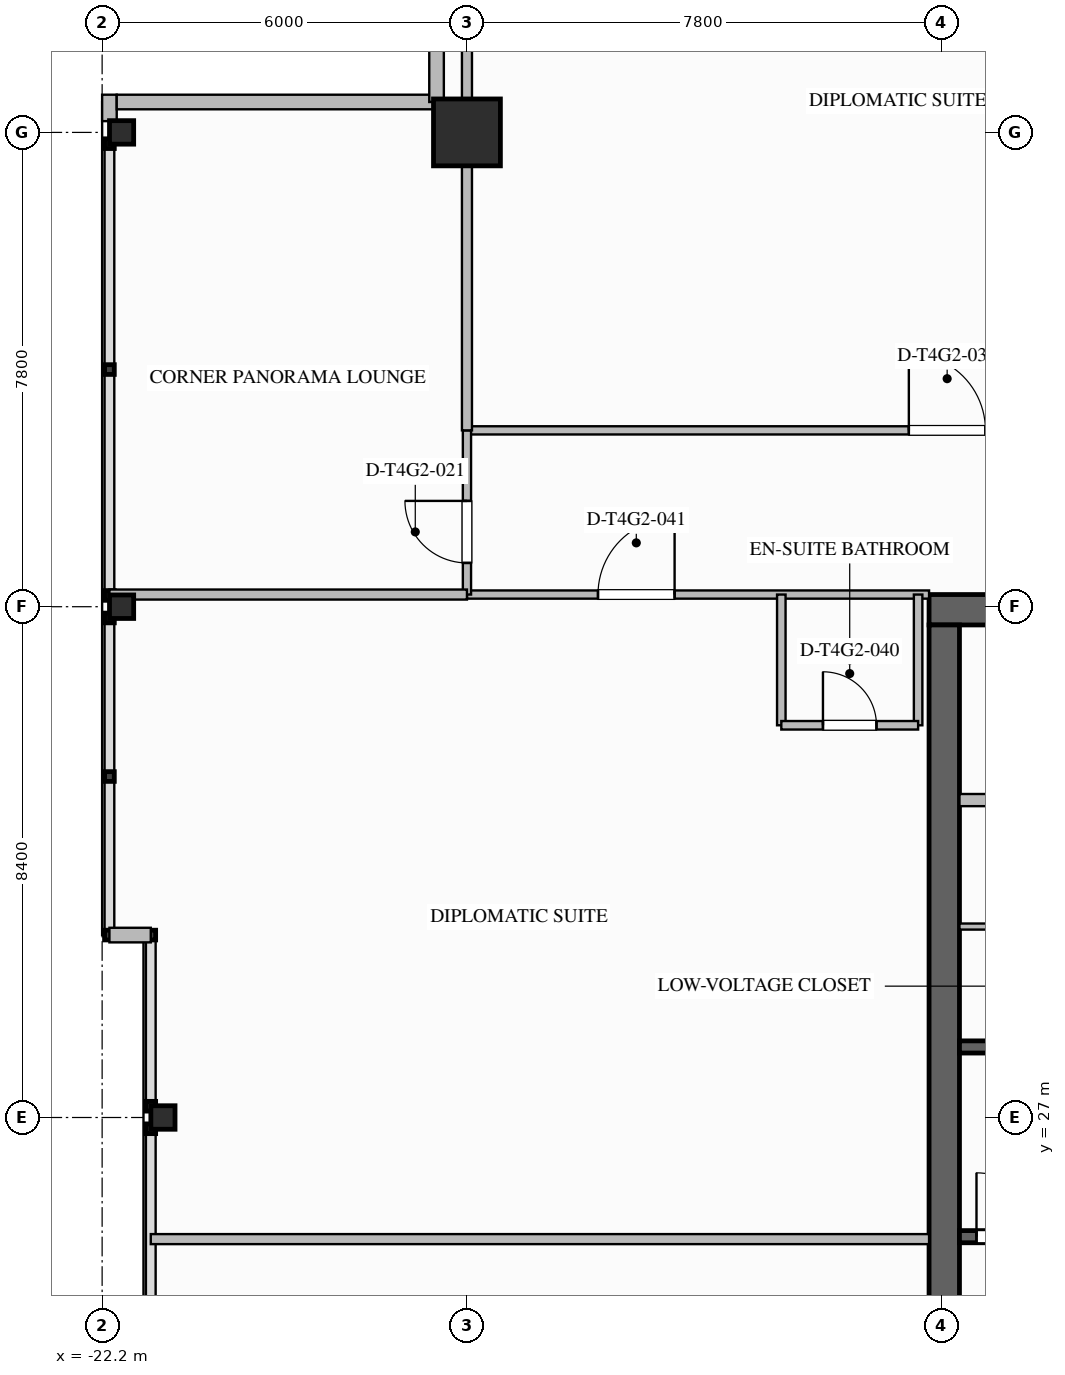
"""IFC4 building model, lengths in metres.
Left out: names, types, materials, properties, quantities, classifications, styles, units other than length and angle.
Written with IfcOpenShell. Run it as: python <this file> out.ifc"""

import sys

from ifc_helpers import new_model, si_unit, direction, frame, frame_2d, origin, origin_2d, place, context, subcontext, project, spatial, rectangle, i_section, extrude, element, fill, save


model = new_model("IFC4")
c1 = context("Model", 3, precision=1e-05, world=origin(), true_north=direction((0.0, 1.0)))
c2 = subcontext(c1, "Body", "Model", "MODEL_VIEW")
j1 = project(units=[si_unit("LENGTHUNIT", "METRE"), si_unit("PLANEANGLEUNIT", "RADIAN")], contexts=[c1])
p1 = place(None, origin())
s1 = spatial("IfcSite", under=j1, at=p1, CompositionType="ELEMENT")
p2 = place(p1, origin())
s2 = spatial("IfcBuilding", under=s1, at=p2, CompositionType="ELEMENT")
p3 = place(p2, frame((0.0, 0.0, 215.9)))
s3 = spatial("IfcBuildingStorey", under=s2, at=p3, CompositionType="ELEMENT", Elevation=215.9)
p4 = place(p3, frame((-8.6, 35.35, 0.0), z_axis=(0.0, 0.0, 1.0), x_axis=(1.0, 0.0, 0.0)))
e1 = element("IfcWall", 1, at=p4, inside=s3, PredefinedType="SHEAR", context=c2, shape_type="SweptSolid", body=[
    extrude(rectangle(XDim=17.2, YDim=0.5, at=frame_2d((8.6, 0.0))), origin(), (0.0, 0.0, 1.0), 3.6),
])
p5 = place(p3, frame((-8.35, 18.9, 0.0), z_axis=(0.0, 0.0, 1.0), x_axis=(0.0, 1.0, 0.0)))
e2 = element("IfcWall", 2, at=p5, inside=s3, PredefinedType="SHEAR", context=c2, shape_type="SweptSolid", body=[
    extrude(rectangle(XDim=16.2, YDim=0.5, at=frame_2d((8.1, 0.0))), origin(), (0.0, 0.0, 1.0), 3.6),
])
p6 = place(p3, frame((-16.2, 43.2, 0.0), z_axis=(0.0, 0.0, 1.0), x_axis=(1.0, 0.0, 0.0)))
e3 = element("IfcColumn", 3, at=p6, inside=s3, PredefinedType="COLUMN", context=c2, shape_type="SweptSolid", body=[
    extrude(rectangle(XDim=1.1, YDim=1.1, at=origin_2d()), origin(), (0.0, 0.0, 1.0), 3.6),
])
for number, where, z_axis, x_axis in (
    (4, (-21.2, 27.0, 0.0), (0.0, 0.0, 1.0), (1.0, 0.0, 0.0)),
    (5, (-21.88, 35.4, 0.0), (0.0, 0.0, 1.0), (1.0, 0.0, 0.0)),
    (6, (-21.88, 43.2, 0.0), (0.0, 0.0, 1.0), (1.0, 0.0, 0.0)),
):
    element("IfcColumn", number, at=place(p3, frame(where, z_axis=z_axis, x_axis=x_axis)), inside=s3, PredefinedType="COLUMN", context=c2, shape_type="SweptSolid", body=[
        extrude(i_section(OverallWidth=0.397, OverallDepth=0.387, WebThickness=0.021, FlangeThickness=0.033, FilletRadius=0.025, at=origin_2d()), origin(), (0.0, 0.0, 1.0), 3.597),
    ])
p7 = place(p3, frame((-22.08, 43.385, 0.0), z_axis=(0.0, 0.0, 1.0), x_axis=(0.0, 1.0, 0.0)))
e7 = element("IfcWall", 7, at=p7, inside=s3, PredefinedType="STANDARD", context=c2, shape_type="SweptSolid", body=[
    extrude(rectangle(XDim=0.435, YDim=0.24, at=frame_2d((0.217, 0.0))), origin(), (0.0, 0.0, 1.0), 3.34),
])
for number, where, z_axis, x_axis in (
    (8, (-21.96, 43.7, 0.0), (0.0, 0.0, 1.0), (1.0, 0.0, 0.0)),
    (9, (-16.7, 43.7, 0.0), (0.0, 0.0, 1.0), (0.0, 1.0, 0.0)),
):
    element("IfcWall", number, at=place(p3, frame(where, z_axis=z_axis, x_axis=x_axis)), inside=s3, PredefinedType="STANDARD", context=c2, shape_type="SweptSolid", body=[
        extrude(rectangle(XDim=5.26, YDim=0.24, at=frame_2d((2.63, 0.0))), origin(), (0.0, 0.0, 1.0), 3.34),
    ])
p8 = place(p3, frame((-21.4, 30.0, 0.0), z_axis=(0.0, 0.0, 1.0), x_axis=(-1.0, 0.0, 0.0)))
e10 = element("IfcWall", 10, at=p8, inside=s3, PredefinedType="STANDARD", context=c2, shape_type="SweptSolid", body=[
    extrude(rectangle(XDim=0.68, YDim=0.24, at=frame_2d((0.34, 0.0))), origin(), (0.0, 0.0, 1.0), 3.34),
])
p9 = place(p3, frame((-8.1, 25.04, 0.0), z_axis=(0.0, 0.0, 1.0), x_axis=(1.0, 0.0, 0.0)))
e11 = element("IfcWall", 11, at=p9, inside=s3, PredefinedType="SOLIDWALL", context=c2, shape_type="SweptSolid", body=[
    extrude(rectangle(XDim=8.1, YDim=0.2, at=frame_2d((4.05, 0.0))), origin(), (0.0, 0.0, 1.0), 3.34),
])
p10 = place(p9, frame((0.28, 0.0, 0.0)))
e12 = element("IfcOpeningElement", 12, at=p10, cuts=e11, PredefinedType="OPENING", context=c2, shape_type="SweptSolid", body=[
    extrude(rectangle(XDim=1.05, YDim=2.1, at=frame_2d((0.525, 1.05))), frame((0.0, 0.11, 0.0), z_axis=(0.0, -1.0, 0.0), x_axis=(1.0, 0.0, 0.0)), (0.0, 0.0, 1.0), 0.22),
])
p11 = place(p3, frame((-8.1, 28.16, 0.0), z_axis=(0.0, 0.0, 1.0), x_axis=(1.0, 0.0, 0.0)))
e13 = element("IfcWall", 13, at=p11, inside=s3, PredefinedType="SOLIDWALL", context=c2, shape_type="SweptSolid", body=[
    extrude(rectangle(XDim=8.1, YDim=0.2, at=frame_2d((4.05, 0.0))), origin(), (0.0, 0.0, 1.0), 3.34),
])
p12 = place(p3, frame((-8.1, 32.22, 0.0), z_axis=(0.0, 0.0, 1.0), x_axis=(1.0, 0.0, 0.0)))
e14 = element("IfcWall", 14, at=p12, inside=s3, PredefinedType="SOLIDWALL", context=c2, shape_type="SweptSolid", body=[
    extrude(rectangle(XDim=7.1, YDim=0.2, at=frame_2d((3.55, 0.0))), origin(), (0.0, 0.0, 1.0), 3.34),
])
p13 = place(p12, frame((0.95, 0.0, 0.0)))
e15 = element("IfcOpeningElement", 15, at=p13, cuts=e14, PredefinedType="OPENING", context=c2, shape_type="SweptSolid", body=[
    extrude(rectangle(XDim=1.1, YDim=2.2, at=frame_2d((0.55, 1.1))), frame((0.0, 0.11, 0.0), z_axis=(0.0, -1.0, 0.0), x_axis=(1.0, 0.0, 0.0)), (0.0, 0.0, 1.0), 0.22),
])
p14 = place(p12, frame((3.27, 0.0, 0.0)))
e16 = element("IfcOpeningElement", 16, at=p14, cuts=e14, PredefinedType="OPENING", context=c2, shape_type="SweptSolid", body=[
    extrude(rectangle(XDim=1.1, YDim=2.2, at=frame_2d((0.55, 1.1))), frame((0.0, 0.11, 0.0), z_axis=(0.0, -1.0, 0.0), x_axis=(1.0, 0.0, 0.0)), (0.0, 0.0, 1.0), 0.22),
])
p15 = place(p12, frame((5.59, 0.0, 0.0)))
e17 = element("IfcOpeningElement", 17, at=p15, cuts=e14, PredefinedType="OPENING", context=c2, shape_type="SweptSolid", body=[
    extrude(rectangle(XDim=1.1, YDim=2.2, at=frame_2d((0.55, 1.1))), frame((0.0, 0.11, 0.0), z_axis=(0.0, -1.0, 0.0), x_axis=(1.0, 0.0, 0.0)), (0.0, 0.0, 1.0), 0.22),
])
p16 = place(p3, frame((-8.1, 30.14, 0.0), z_axis=(0.0, 0.0, 1.0), x_axis=(1.0, 0.0, 0.0)))
e18 = element("IfcWall", 18, at=p16, inside=s3, PredefinedType="PARTITIONING", context=c2, shape_type="SweptSolid", body=[
    extrude(rectangle(XDim=7.1, YDim=0.1, at=frame_2d((3.55, 0.0))), origin(), (0.0, 0.0, 1.0), 3.34),
])
p17 = place(p16, frame((0.55, 0.0, 0.0)))
e19 = element("IfcOpeningElement", 19, at=p17, cuts=e18, PredefinedType="OPENING", context=c2, shape_type="SweptSolid", body=[
    extrude(rectangle(XDim=0.88, YDim=2.1, at=frame_2d((0.44, 1.05))), frame((0.0, 0.06, 0.0), z_axis=(0.0, -1.0, 0.0), x_axis=(1.0, 0.0, 0.0)), (0.0, 0.0, 1.0), 0.12),
])
p18 = place(p16, frame((3.6, 0.0, 0.0)))
e20 = element("IfcOpeningElement", 20, at=p18, cuts=e18, PredefinedType="OPENING", context=c2, shape_type="SweptSolid", body=[
    extrude(rectangle(XDim=0.92, YDim=2.1, at=frame_2d((0.46, 1.05))), frame((0.0, 0.06, 0.0), z_axis=(0.0, -1.0, 0.0), x_axis=(1.0, 0.0, 0.0)), (0.0, 0.0, 1.0), 0.12),
])
p19 = place(p3, frame((-16.2, 38.3, 0.0), z_axis=(0.0, 0.0, 1.0), x_axis=(1.0, 0.0, 0.0)))
e21 = element("IfcWall", 21, at=p19, inside=s3, PredefinedType="PARTITIONING", context=c2, shape_type="SweptSolid", body=[
    extrude(rectangle(XDim=38.28, YDim=0.135, at=frame_2d((19.14, 0.0))), origin(), (0.0, 0.0, 1.0), 3.34),
])
p20 = place(p19, frame((33.355, 0.0, 0.0)))
e22 = element("IfcOpeningElement", 22, at=p20, cuts=e21, PredefinedType="OPENING", context=c2, shape_type="SweptSolid", body=[
    extrude(rectangle(XDim=1.26, YDim=2.2, at=frame_2d((0.63, 1.1))), frame((0.0, 0.077, 0.0), z_axis=(0.0, -1.0, 0.0), x_axis=(1.0, 0.0, 0.0)), (0.0, 0.0, 1.0), 0.155),
])
p21 = place(p19, frame((7.268, 0.0, 0.0)))
e23 = element("IfcOpeningElement", 23, at=p21, cuts=e21, PredefinedType="OPENING", context=c2, shape_type="SweptSolid", body=[
    extrude(rectangle(XDim=1.26, YDim=2.2, at=frame_2d((0.63, 1.1))), frame((0.0, 0.077, 0.0), z_axis=(0.0, -1.0, 0.0), x_axis=(1.0, 0.0, 0.0)), (0.0, 0.0, 1.0), 0.155),
])
p22 = place(p19, frame((23.468, 0.0, 0.0)))
e24 = element("IfcOpeningElement", 24, at=p22, cuts=e21, PredefinedType="OPENING", context=c2, shape_type="SweptSolid", body=[
    extrude(rectangle(XDim=1.26, YDim=2.2, at=frame_2d((0.63, 1.1))), frame((0.0, 0.077, 0.0), z_axis=(0.0, -1.0, 0.0), x_axis=(1.0, 0.0, 0.0)), (0.0, 0.0, 1.0), 0.155),
])
p23 = place(p3, frame((-16.2, 35.6, 0.0), z_axis=(0.0, 0.0, 1.0), x_axis=(1.0, 0.0, 0.0)))
e25 = element("IfcWall", 25, at=p23, inside=s3, PredefinedType="PARTITIONING", context=c2, shape_type="SweptSolid", body=[
    extrude(rectangle(XDim=7.6, YDim=0.135, at=frame_2d((3.8, 0.0))), origin(), (0.0, 0.0, 1.0), 2.718),
])
p24 = place(p23, frame((2.155, 0.0, 0.0)))
e26 = element("IfcOpeningElement", 26, at=p24, cuts=e25, PredefinedType="OPENING", context=c2, shape_type="SweptSolid", body=[
    extrude(rectangle(XDim=1.26, YDim=2.2, at=frame_2d((0.63, 1.1))), frame((0.0, 0.077, 0.0), z_axis=(0.0, -1.0, 0.0), x_axis=(1.0, 0.0, 0.0)), (0.0, 0.0, 1.0), 0.155),
])
p25 = place(p3, frame((-16.2, 35.6, 0.0), z_axis=(0.0, 0.0, 1.0), x_axis=(0.0, 1.0, 0.0)))
e27 = element("IfcWall", 27, at=p25, inside=s3, PredefinedType="PARTITIONING", context=c2, shape_type="SweptSolid", body=[
    extrude(rectangle(XDim=2.7, YDim=0.135, at=frame_2d((1.35, 0.0))), origin(), (0.0, 0.0, 1.0), 2.714),
])
p26 = place(p25, frame((0.52, 0.0, 0.0)))
e28 = element("IfcOpeningElement", 28, at=p26, cuts=e27, PredefinedType="OPENING", context=c2, shape_type="SweptSolid", body=[
    extrude(rectangle(XDim=1.02, YDim=2.15, at=frame_2d((0.51, 1.075))), frame((0.0, 0.077, 0.0), z_axis=(0.0, -1.0, 0.0), x_axis=(1.0, 0.0, 0.0)), (0.0, 0.0, 1.0), 0.155),
])
p27 = place(p3, frame((-16.2, 38.3, 0.0), z_axis=(0.0, 0.0, 1.0), x_axis=(0.0, 1.0, 0.0)))
e29 = element("IfcWall", 29, at=p27, inside=s3, PredefinedType="PARTITIONING", context=c2, shape_type="SweptSolid", body=[
    extrude(rectangle(XDim=10.78, YDim=0.165, at=frame_2d((5.39, 0.0))), origin(), (0.0, 0.0, 1.0), 2.714),
])
p28 = place(p3, frame((-22.08, 35.6, 0.0), z_axis=(0.0, 0.0, 1.0), x_axis=(1.0, 0.0, 0.0)))
e30 = element("IfcWall", 30, at=p28, inside=s3, PredefinedType="PARTITIONING", context=c2, shape_type="SweptSolid", body=[
    extrude(rectangle(XDim=5.88, YDim=0.165, at=frame_2d((2.94, 0.0))), origin(), (0.0, 0.0, 1.0), 2.714),
])
p29 = place(p3, frame((-21.4, 25.0, 0.0), z_axis=(0.0, 0.0, 1.0), x_axis=(1.0, 0.0, 0.0)))
e31 = element("IfcWall", 31, at=p29, inside=s3, PredefinedType="PARTITIONING", context=c2, shape_type="SweptSolid", body=[
    extrude(rectangle(XDim=12.8, YDim=0.165, at=frame_2d((6.4, 0.0))), origin(), (0.0, 0.0, 1.0), 3.34),
])
for number, where, z_axis, x_axis in (
    (32, (-11.03, 35.6, 0.0), (0.0, 0.0, 1.0), (0.0, -1.0, 0.0)),
    (33, (-8.78, 35.6, 0.0), (0.0, 0.0, 1.0), (0.0, -1.0, 0.0)),
):
    element("IfcWall", number, at=place(p3, frame(where, z_axis=z_axis, x_axis=x_axis)), inside=s3, PredefinedType="PLUMBINGWALL", context=c2, shape_type="SweptSolid", body=[
        extrude(rectangle(XDim=2.15, YDim=0.14, at=frame_2d((1.075, 0.0))), origin(), (0.0, 0.0, 1.0), 3.34),
    ])
p30 = place(p3, frame((-11.03, 33.45, 0.0), z_axis=(0.0, 0.0, 1.0), x_axis=(1.0, 0.0, 0.0)))
e34 = element("IfcWall", 34, at=p30, inside=s3, PredefinedType="PLUMBINGWALL", context=c2, shape_type="SweptSolid", body=[
    extrude(rectangle(XDim=2.25, YDim=0.14, at=frame_2d((1.125, 0.0))), origin(), (0.0, 0.0, 1.0), 3.34),
])
p31 = place(p30, frame((0.685, 0.0, 0.0)))
e35 = element("IfcOpeningElement", 35, at=p31, cuts=e34, PredefinedType="OPENING", context=c2, shape_type="SweptSolid", body=[
    extrude(rectangle(XDim=0.88, YDim=2.1, at=frame_2d((0.44, 1.05))), frame((0.0, 0.08, 0.0), z_axis=(0.0, -1.0, 0.0), x_axis=(1.0, 0.0, 0.0)), (0.0, 0.0, 1.0), 0.16),
])
p32 = place(p10, origin())
e36 = element("IfcDoor", 36, at=p32, inside=s3, OperationType="SINGLE_SWING_LEFT", PredefinedType="DOOR", context=c2, shape_type="SweptSolid", body=[
    extrude(rectangle(XDim=1.05, YDim=2.1, at=frame_2d((0.525, 1.05))), frame((0.0, 0.025, 0.0), z_axis=(0.0, -1.0, 0.0), x_axis=(1.0, 0.0, 0.0)), (0.0, 0.0, 1.0), 0.05),
])
fill(e12, e36)
p33 = place(p26, origin())
e37 = element("IfcDoor", 37, at=p33, inside=s3, OperationType="SINGLE_SWING_RIGHT", PredefinedType="DOOR", context=c2, shape_type="SweptSolid", body=[
    extrude(rectangle(XDim=1.02, YDim=2.15, at=frame_2d((0.51, 1.075))), frame((0.0, 0.025, 0.0), z_axis=(0.0, -1.0, 0.0), x_axis=(1.0, 0.0, 0.0)), (0.0, 0.0, 1.0), 0.05),
])
fill(e28, e37)
p34 = place(p21, origin())
e38 = element("IfcDoor", 38, at=p34, inside=s3, OperationType="SINGLE_SWING_LEFT", PredefinedType="DOOR", context=c2, shape_type="SweptSolid", body=[
    extrude(rectangle(XDim=1.26, YDim=2.2, at=frame_2d((0.63, 1.1))), frame((0.0, 0.025, 0.0), z_axis=(0.0, -1.0, 0.0), x_axis=(1.0, 0.0, 0.0)), (0.0, 0.0, 1.0), 0.05),
])
fill(e23, e38)
p35 = place(p31, origin())
e39 = element("IfcDoor", 39, at=p35, inside=s3, OperationType="SINGLE_SWING_LEFT", PredefinedType="DOOR", context=c2, shape_type="SweptSolid", body=[
    extrude(rectangle(XDim=0.88, YDim=2.1, at=frame_2d((0.44, 1.05))), frame((0.0, 0.025, 0.0), z_axis=(0.0, -1.0, 0.0), x_axis=(1.0, 0.0, 0.0)), (0.0, 0.0, 1.0), 0.05),
])
fill(e35, e39)
p36 = place(p24, origin())
e40 = element("IfcDoor", 40, at=p36, inside=s3, OperationType="SINGLE_SWING_RIGHT", PredefinedType="DOOR", context=c2, shape_type="SweptSolid", body=[
    extrude(rectangle(XDim=1.26, YDim=2.2, at=frame_2d((0.63, 1.1))), frame((0.0, 0.025, 0.0), z_axis=(0.0, -1.0, 0.0), x_axis=(1.0, 0.0, 0.0)), (0.0, 0.0, 1.0), 0.05),
])
fill(e26, e40)
save(model, sys.argv[1])
